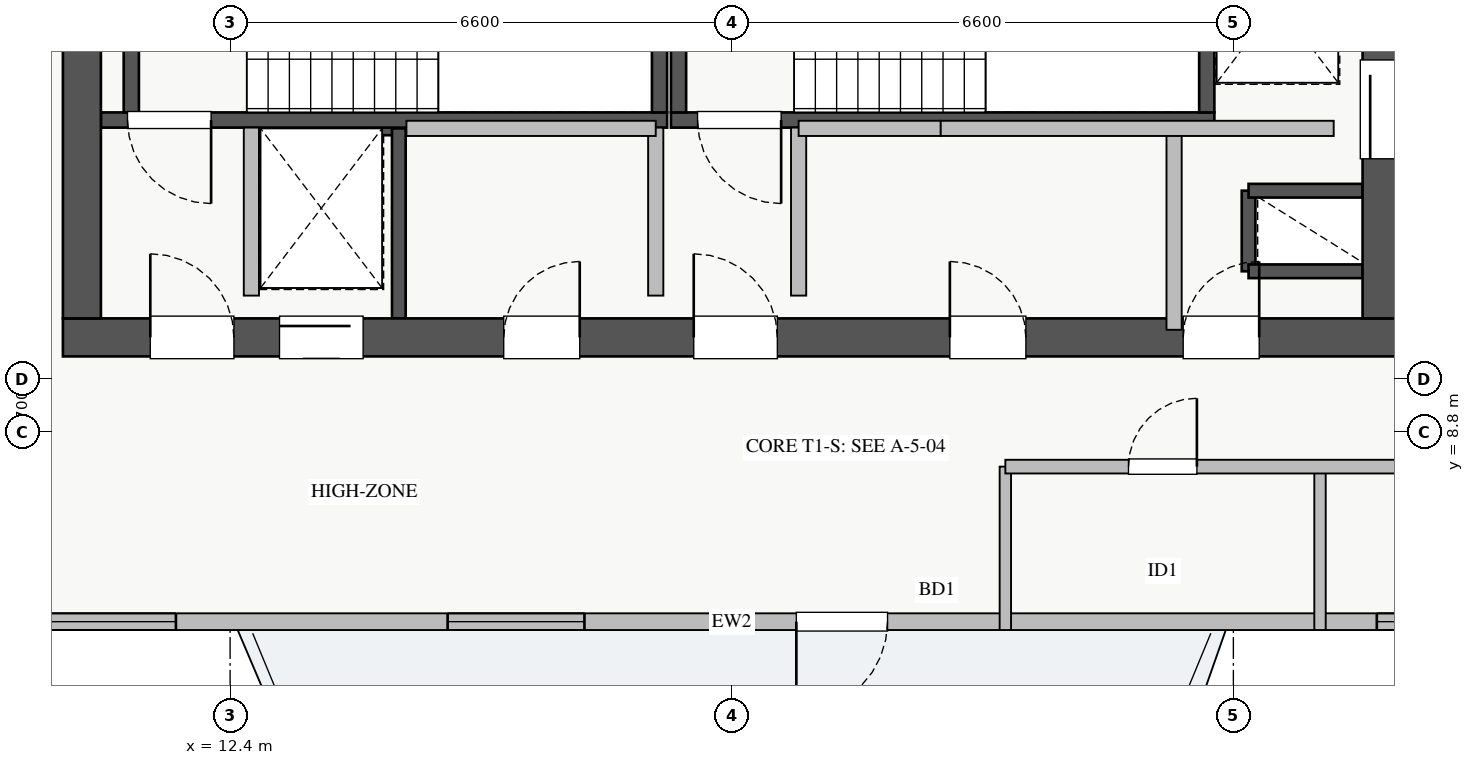
"""IFC4 building model, lengths in metres.
Left out: names, types, materials, properties, quantities, classifications, styles, units other than length and angle.
Written with IfcOpenShell. Run it as: python <this file> out.ifc"""

import sys

from ifc_helpers import new_model, si_unit, direction, frame, frame_2d, origin, place, context, subcontext, project, spatial, rectangle, extrude, source, transform, mapped, element, fill, save


model = new_model("IFC4")
c1 = context("Model", 3, precision=1e-05, world=origin(), true_north=direction((0.0, 1.0)))
c2 = subcontext(c1, "Body", "Model", "MODEL_VIEW")
j1 = project(units=[si_unit("LENGTHUNIT", "METRE"), si_unit("PLANEANGLEUNIT", "RADIAN")], contexts=[c1])
p1 = place(None, origin())
s1 = spatial("IfcSite", under=j1, at=p1, CompositionType="ELEMENT")
p2 = place(p1, origin())
s2 = spatial("IfcBuilding", under=s1, at=p2, CompositionType="ELEMENT")
p3 = place(p2, frame((0.0, 0.0, 216.5)))
s3 = spatial("IfcBuildingStorey", under=s2, at=p3, CompositionType="ELEMENT", Elevation=216.5)
p4 = place(p3, frame((12.68, 12.8, 0.0), z_axis=(0.0, 0.0, 1.0), x_axis=(1.0, 0.0, 0.0)))
e1 = element("IfcWall", 1, at=p4, inside=s3, PredefinedType="SHEAR", context=c2, shape_type="SweptSolid", body=[
    extrude(rectangle(XDim=1.94, YDim=0.18, at=frame_2d((0.97, 0.0))), origin(), (0.0, 0.0, 1.0), 3.07),
])
p5 = place(p3, frame((14.62, 10.3, 0.0), z_axis=(0.0, 0.0, 1.0), x_axis=(0.0, 1.0, 0.0)))
e2 = element("IfcWall", 2, at=p5, inside=s3, PredefinedType="SHEAR", context=c2, shape_type="SweptSolid", body=[
    extrude(rectangle(XDim=2.5, YDim=0.18, at=frame_2d((1.25, 0.0))), origin(), (0.0, 0.0, 1.0), 3.07),
])
p6 = place(p3, frame((25.8, 10.92, 0.0), z_axis=(0.0, 0.0, 1.0), x_axis=(0.0, 1.0, 0.0)))
e3 = element("IfcWall", 3, at=p6, inside=s3, PredefinedType="SHEAR", context=c2, shape_type="SweptSolid", body=[
    extrude(rectangle(XDim=1.06, YDim=0.18, at=frame_2d((0.53, 0.0))), origin(), (0.0, 0.0, 1.0), 3.07),
])
for number, where, z_axis, x_axis in (
    (4, (25.8, 11.98, 0.0), (0.0, 0.0, 1.0), (1.0, 0.0, 0.0)),
    (5, (25.8, 10.92, 0.0), (0.0, 0.0, 1.0), (1.0, 0.0, 0.0)),
):
    element("IfcWall", number, at=place(p3, frame(where, z_axis=z_axis, x_axis=x_axis)), inside=s3, PredefinedType="SHEAR", context=c2, shape_type="SweptSolid", body=[
        extrude(rectangle(XDim=1.5, YDim=0.18, at=frame_2d((0.75, 0.0))), origin(), (0.0, 0.0, 1.0), 3.07),
    ])
p7 = place(p3, frame((10.7, 12.91, 0.0), z_axis=(0.0, 0.0, 1.0), x_axis=(1.0, 0.0, 0.0)))
e6 = element("IfcWall", 6, at=p7, inside=s3, PredefinedType="SHEAR", context=c2, shape_type="SweptSolid", body=[
    extrude(rectangle(XDim=7.45, YDim=0.2, at=frame_2d((3.725, 0.0))), origin(), (0.0, 0.0, 1.0), 3.25),
])
p8 = place(p7, frame((0.35, 0.0, 0.0)))
e7 = element("IfcOpeningElement", 7, at=p8, cuts=e6, PredefinedType="OPENING", context=c2, shape_type="SweptSolid", body=[
    extrude(rectangle(XDim=1.1, YDim=2.05, at=frame_2d((0.55, 1.025))), frame((0.0, 0.11, 0.0), z_axis=(0.0, -1.0, 0.0), x_axis=(1.0, 0.0, 0.0)), (0.0, 0.0, 1.0), 0.22),
])
for number, where, z_axis, x_axis in (
    (8, (11.1, 13.01, 0.0), (0.0, 0.0, 1.0), (0.0, 1.0, 0.0)),
    (9, (18.05, 13.01, 0.0), (0.0, 0.0, 1.0), (0.0, 1.0, 0.0)),
):
    element("IfcWall", number, at=place(p3, frame(where, z_axis=z_axis, x_axis=x_axis)), inside=s3, PredefinedType="SHEAR", context=c2, shape_type="SweptSolid", body=[
        extrude(rectangle(XDim=2.94, YDim=0.2, at=frame_2d((1.47, 0.0))), origin(), (0.0, 0.0, 1.0), 3.25),
    ])
p9 = place(p3, frame((18.2, 12.91, 0.0), z_axis=(0.0, 0.0, 1.0), x_axis=(1.0, 0.0, 0.0)))
e10 = element("IfcWall", 10, at=p9, inside=s3, PredefinedType="SHEAR", context=c2, shape_type="SweptSolid", body=[
    extrude(rectangle(XDim=7.15, YDim=0.2, at=frame_2d((3.575, 0.0))), origin(), (0.0, 0.0, 1.0), 3.25),
])
p10 = place(p9, frame((0.35, 0.0, 0.0)))
e11 = element("IfcOpeningElement", 11, at=p10, cuts=e10, PredefinedType="OPENING", context=c2, shape_type="SweptSolid", body=[
    extrude(rectangle(XDim=1.1, YDim=2.05, at=frame_2d((0.55, 1.025))), frame((0.0, 0.11, 0.0), z_axis=(0.0, -1.0, 0.0), x_axis=(1.0, 0.0, 0.0)), (0.0, 0.0, 1.0), 0.22),
])
for number, where, z_axis, x_axis in (
    (12, (18.3, 13.01, 0.0), (0.0, 0.0, 1.0), (0.0, 1.0, 0.0)),
    (13, (25.25, 13.01, 0.0), (0.0, 0.0, 1.0), (0.0, 1.0, 0.0)),
):
    element("IfcWall", number, at=place(p3, frame(where, z_axis=z_axis, x_axis=x_axis)), inside=s3, PredefinedType="SHEAR", context=c2, shape_type="SweptSolid", body=[
        extrude(rectangle(XDim=2.94, YDim=0.2, at=frame_2d((1.47, 0.0))), origin(), (0.0, 0.0, 1.0), 3.25),
    ])
p11 = place(p3, frame((10.2, 10.05, 0.0), z_axis=(0.0, 0.0, 1.0), x_axis=(1.0, 0.0, 0.0)))
e14 = element("IfcWall", 14, at=p11, inside=s3, PredefinedType="SHEAR", context=c2, shape_type="SweptSolid", body=[
    extrude(rectangle(XDim=17.6, YDim=0.5, at=frame_2d((8.8, 0.0))), origin(), (0.0, 0.0, 1.0), 3.25),
])
p12 = place(p11, frame((1.15, 0.0, 0.0)))
e15 = element("IfcOpeningElement", 15, at=p12, cuts=e14, PredefinedType="OPENING", context=c2, shape_type="SweptSolid", body=[
    extrude(rectangle(XDim=1.1, YDim=2.05, at=frame_2d((0.55, 1.025))), frame((0.0, 0.26, 0.0), z_axis=(0.0, -1.0, 0.0), x_axis=(1.0, 0.0, 0.0)), (0.0, 0.0, 1.0), 0.52),
])
p13 = place(p11, frame((8.3, 0.0, 0.0)))
e16 = element("IfcOpeningElement", 16, at=p13, cuts=e14, PredefinedType="OPENING", context=c2, shape_type="SweptSolid", body=[
    extrude(rectangle(XDim=1.1, YDim=2.05, at=frame_2d((0.55, 1.025))), frame((0.0, 0.26, 0.0), z_axis=(0.0, -1.0, 0.0), x_axis=(1.0, 0.0, 0.0)), (0.0, 0.0, 1.0), 0.52),
])
p14 = place(p11, frame((2.85, 0.0, 0.0)))
e17 = element("IfcOpeningElement", 17, at=p14, cuts=e14, PredefinedType="OPENING", context=c2, shape_type="SweptSolid", body=[
    extrude(rectangle(XDim=1.1, YDim=2.05, at=frame_2d((0.55, 1.025))), frame((0.0, 0.26, 0.0), z_axis=(0.0, -1.0, 0.0), x_axis=(1.0, 0.0, 0.0)), (0.0, 0.0, 1.0), 0.52),
])
p15 = place(p11, frame((5.8, 0.0, 0.0)))
e18 = element("IfcOpeningElement", 18, at=p15, cuts=e14, PredefinedType="OPENING", context=c2, shape_type="SweptSolid", body=[
    extrude(rectangle(XDim=1.0, YDim=2.05, at=frame_2d((0.5, 1.025))), frame((0.0, 0.26, 0.0), z_axis=(0.0, -1.0, 0.0), x_axis=(1.0, 0.0, 0.0)), (0.0, 0.0, 1.0), 0.52),
])
p16 = place(p11, frame((14.74, 0.0, 0.0)))
e19 = element("IfcOpeningElement", 19, at=p16, cuts=e14, PredefinedType="OPENING", context=c2, shape_type="SweptSolid", body=[
    extrude(rectangle(XDim=1.0, YDim=2.05, at=frame_2d((0.5, 1.025))), frame((0.0, 0.26, 0.0), z_axis=(0.0, -1.0, 0.0), x_axis=(1.0, 0.0, 0.0)), (0.0, 0.0, 1.0), 0.52),
])
p17 = place(p11, frame((11.67, 0.0, 0.0)))
e20 = element("IfcOpeningElement", 20, at=p17, cuts=e14, PredefinedType="OPENING", context=c2, shape_type="SweptSolid", body=[
    extrude(rectangle(XDim=1.0, YDim=2.05, at=frame_2d((0.5, 1.025))), frame((0.0, 0.26, 0.0), z_axis=(0.0, -1.0, 0.0), x_axis=(1.0, 0.0, 0.0)), (0.0, 0.0, 1.0), 0.52),
])
p18 = place(p3, frame((10.45, 10.3, 0.0), z_axis=(0.0, 0.0, 1.0), x_axis=(0.0, 1.0, 0.0)))
e21 = element("IfcWall", 21, at=p18, inside=s3, PredefinedType="SHEAR", context=c2, shape_type="SweptSolid", body=[
    extrude(rectangle(XDim=6.2, YDim=0.5, at=frame_2d((3.1, 0.0))), origin(), (0.0, 0.0, 1.0), 3.25),
])
p19 = place(p3, frame((27.55, 10.3, 0.0), z_axis=(0.0, 0.0, 1.0), x_axis=(0.0, 1.0, 0.0)))
e22 = element("IfcWall", 22, at=p19, inside=s3, PredefinedType="SHEAR", context=c2, shape_type="SweptSolid", body=[
    extrude(rectangle(XDim=6.2, YDim=0.5, at=frame_2d((3.1, 0.0))), origin(), (0.0, 0.0, 1.0), 3.25),
])
p20 = place(p19, frame((2.1, 0.0, 0.0)))
e23 = element("IfcOpeningElement", 23, at=p20, cuts=e22, PredefinedType="OPENING", context=c2, shape_type="SweptSolid", body=[
    extrude(rectangle(XDim=1.3, YDim=2.05, at=frame_2d((0.65, 1.025))), frame((0.0, 0.26, 0.0), z_axis=(0.0, -1.0, 0.0), x_axis=(1.0, 0.0, 0.0)), (0.0, 0.0, 1.0), 0.52),
])
p21 = place(p3, frame((7.65, 6.31, 0.0), z_axis=(0.0, 0.0, 1.0), x_axis=(1.0, 0.0, 0.0)))
e24 = element("IfcWall", 24, at=p21, inside=s3, PredefinedType="STANDARD", context=c2, shape_type="SweptSolid", body=[
    extrude(rectangle(XDim=22.7, YDim=0.22, at=frame_2d((11.35, 0.0))), origin(), (0.0, 0.0, 1.0), 2.61),
])
p22 = place(p21, frame((12.2, 0.0, 0.0)))
e25 = element("IfcOpeningElement", 25, at=p22, cuts=e24, PredefinedType="OPENING", context=c2, shape_type="SweptSolid", body=[
    extrude(rectangle(XDim=1.2, YDim=2.1, at=frame_2d((0.6, 1.05))), frame((0.0, 0.12, 0.0), z_axis=(0.0, -1.0, 0.0), x_axis=(1.0, 0.0, 0.0)), (0.0, 0.0, 1.0), 0.24),
])
p23 = place(p21, frame((1.637, 0.0, 0.9)))
e26 = element("IfcOpeningElement", 26, at=p23, cuts=e24, PredefinedType="OPENING", context=c2, shape_type="SweptSolid", body=[
    extrude(rectangle(XDim=2.4, YDim=1.48, at=frame_2d((1.2, 0.74))), frame((0.0, 0.12, 0.0), z_axis=(0.0, -1.0, 0.0), x_axis=(1.0, 0.0, 0.0)), (0.0, 0.0, 1.0), 0.24),
])
p24 = place(p21, frame((7.612, 0.0, 0.9)))
e27 = element("IfcOpeningElement", 27, at=p24, cuts=e24, PredefinedType="OPENING", context=c2, shape_type="SweptSolid", body=[
    extrude(rectangle(XDim=1.8, YDim=1.45, at=frame_2d((0.9, 0.725))), frame((0.0, 0.12, 0.0), z_axis=(0.0, -1.0, 0.0), x_axis=(1.0, 0.0, 0.0)), (0.0, 0.0, 1.0), 0.24),
])
p25 = place(p21, frame((19.837, 0.0, 0.9)))
e28 = element("IfcOpeningElement", 28, at=p25, cuts=e24, PredefinedType="OPENING", context=c2, shape_type="SweptSolid", body=[
    extrude(rectangle(XDim=2.1, YDim=1.5, at=frame_2d((1.05, 0.75))), frame((0.0, 0.12, 0.0), z_axis=(0.0, -1.0, 0.0), x_axis=(1.0, 0.0, 0.0)), (0.0, 0.0, 1.0), 0.24),
])
for number, where, z_axis, x_axis in (
    (29, (12.68, 10.6, 0.0), (0.0, 0.0, 1.0), (0.0, 1.0, 0.0)),
    (30, (18.0, 10.6, 0.0), (0.0, 0.0, 1.0), (0.0, 1.0, 0.0)),
    (31, (19.88, 10.6, 0.0), (0.0, 0.0, 1.0), (0.0, 1.0, 0.0)),
):
    element("IfcWall", number, at=place(p3, frame(where, z_axis=z_axis, x_axis=x_axis)), inside=s3, PredefinedType="PARTITIONING", context=c2, shape_type="SweptSolid", body=[
        extrude(rectangle(XDim=2.21, YDim=0.2, at=frame_2d((1.105, 0.0))), origin(), (0.0, 0.0, 1.0), 3.07),
    ])
p26 = place(p3, frame((14.72, 12.8, 0.0), z_axis=(0.0, 0.0, 1.0), x_axis=(1.0, 0.0, 0.0)))
e32 = element("IfcWall", 32, at=p26, inside=s3, PredefinedType="PARTITIONING", context=c2, shape_type="SweptSolid", body=[
    extrude(rectangle(XDim=3.28, YDim=0.2, at=frame_2d((1.64, 0.0))), origin(), (0.0, 0.0, 1.0), 3.07),
])
p27 = place(p3, frame((24.82, 10.15, 0.0), z_axis=(0.0, 0.0, 1.0), x_axis=(0.0, 1.0, 0.0)))
e33 = element("IfcWall", 33, at=p27, inside=s3, PredefinedType="PARTITIONING", context=c2, shape_type="SweptSolid", body=[
    extrude(rectangle(XDim=2.65, YDim=0.2, at=frame_2d((1.325, 0.0))), origin(), (0.0, 0.0, 1.0), 3.07),
])
p28 = place(p3, frame((19.88, 12.8, 0.0), z_axis=(0.0, 0.0, 1.0), x_axis=(1.0, 0.0, 0.0)))
e34 = element("IfcWall", 34, at=p28, inside=s3, PredefinedType="PARTITIONING", context=c2, shape_type="SweptSolid", body=[
    extrude(rectangle(XDim=1.87, YDim=0.2, at=frame_2d((0.935, 0.0))), origin(), (0.0, 0.0, 1.0), 3.07),
])
p29 = place(p3, frame((21.75, 12.8, 0.0), z_axis=(0.0, 0.0, 1.0), x_axis=(1.0, 0.0, 0.0)))
e35 = element("IfcWall", 35, at=p29, inside=s3, PredefinedType="PARTITIONING", context=c2, shape_type="SweptSolid", body=[
    extrude(rectangle(XDim=5.17, YDim=0.2, at=frame_2d((2.585, 0.0))), origin(), (0.0, 0.0, 1.0), 3.07),
])
for number, where, z_axis, x_axis in (
    (36, (22.6, 6.2, 0.0), (0.0, 0.0, 1.0), (0.0, 1.0, 0.0)),
    (37, (26.74, 6.2, 0.0), (0.0, 0.0, 1.0), (0.0, 1.0, 0.0)),
):
    element("IfcWall", number, at=place(p3, frame(where, z_axis=z_axis, x_axis=x_axis)), inside=s3, PredefinedType="PARTITIONING", context=c2, shape_type="SweptSolid", body=[
        extrude(rectangle(XDim=2.15, YDim=0.15, at=frame_2d((1.075, 0.0))), origin(), (0.0, 0.0, 1.0), 3.07),
    ])
p30 = place(p3, frame((22.6, 8.35, 0.0), z_axis=(0.0, 0.0, 1.0), x_axis=(1.0, 0.0, 0.0)))
e38 = element("IfcWall", 38, at=p30, inside=s3, PredefinedType="PARTITIONING", context=c2, shape_type="SweptSolid", body=[
    extrude(rectangle(XDim=9.85, YDim=0.18, at=frame_2d((4.925, 0.0))), origin(), (0.0, 0.0, 1.0), 3.07),
])
p31 = place(p30, frame((1.62, 0.0, 0.0)))
e39 = element("IfcOpeningElement", 39, at=p31, cuts=e38, PredefinedType="OPENING", context=c2, shape_type="SweptSolid", body=[
    extrude(rectangle(XDim=0.9, YDim=2.05, at=frame_2d((0.45, 1.025))), frame((0.0, 0.1, 0.0), z_axis=(0.0, -1.0, 0.0), x_axis=(1.0, 0.0, 0.0)), (0.0, 0.0, 1.0), 0.2),
])
p32 = place(p30, frame((5.76, 0.0, 0.0)))
e40 = element("IfcOpeningElement", 40, at=p32, cuts=e38, PredefinedType="OPENING", context=c2, shape_type="SweptSolid", body=[
    extrude(rectangle(XDim=0.9, YDim=2.05, at=frame_2d((0.45, 1.025))), frame((0.0, 0.1, 0.0), z_axis=(0.0, -1.0, 0.0), x_axis=(1.0, 0.0, 0.0)), (0.0, 0.0, 1.0), 0.2),
])
m1 = source(origin(), c2, "Body", "SweptSolid", [
    extrude(rectangle(XDim=1.2, YDim=2.1, at=frame_2d((0.6, 1.05))), frame((0.0, 0.025, 0.0), z_axis=(0.0, -1.0, 0.0), x_axis=(1.0, 0.0, 0.0)), (0.0, 0.0, 1.0), 0.05),
])
p33 = place(p22, frame((1.2, 0.0, 0.0), z_axis=(0.0, 0.0, 1.0), x_axis=(-1.0, 0.0, 0.0)))
e41 = element("IfcDoor", 41, at=p33, inside=s3, OperationType="SINGLE_SWING_LEFT", PredefinedType="DOOR", context=c2, shape_type="MappedRepresentation", body=[
    mapped(m1, transform((0.0, 0.0, 0.0), x_axis=(1.0, 0.0, 0.0), y_axis=(0.0, 1.0, 0.0), z_axis=(0.0, 0.0, 1.0), scale=1.0)),
])
fill(e25, e41)
m2 = source(origin(), c2, "Body", "SweptSolid", [
    extrude(rectangle(XDim=2.4, YDim=1.48, at=frame_2d((1.2, 0.74))), frame((0.0, 0.03, 0.0), z_axis=(0.0, -1.0, 0.0), x_axis=(1.0, 0.0, 0.0)), (0.0, 0.0, 1.0), 0.06),
])
p34 = place(p23, origin())
e42 = element("IfcWindow", 42, at=p34, inside=s3, PartitioningType="TRIPLE_PANEL_VERTICAL", PredefinedType="WINDOW", context=c2, shape_type="MappedRepresentation", body=[
    mapped(m2, transform((0.0, 0.0, 0.0), x_axis=(1.0, 0.0, 0.0), y_axis=(0.0, 1.0, 0.0), z_axis=(0.0, 0.0, 1.0), scale=1.0)),
])
fill(e26, e42)
m3 = source(origin(), c2, "Body", "SweptSolid", [
    extrude(rectangle(XDim=1.8, YDim=1.45, at=frame_2d((0.9, 0.725))), frame((0.0, 0.03, 0.0), z_axis=(0.0, -1.0, 0.0), x_axis=(1.0, 0.0, 0.0)), (0.0, 0.0, 1.0), 0.06),
])
p35 = place(p24, origin())
e43 = element("IfcWindow", 43, at=p35, inside=s3, PartitioningType="DOUBLE_PANEL_VERTICAL", PredefinedType="WINDOW", context=c2, shape_type="MappedRepresentation", body=[
    mapped(m3, transform((0.0, 0.0, 0.0), x_axis=(1.0, 0.0, 0.0), y_axis=(0.0, 1.0, 0.0), z_axis=(0.0, 0.0, 1.0), scale=1.0)),
])
fill(e27, e43)
m4 = source(origin(), c2, "Body", "SweptSolid", [
    extrude(rectangle(XDim=2.1, YDim=1.5, at=frame_2d((1.05, 0.75))), frame((0.0, 0.03, 0.0), z_axis=(0.0, -1.0, 0.0), x_axis=(1.0, 0.0, 0.0)), (0.0, 0.0, 1.0), 0.06),
])
p36 = place(p25, origin())
e44 = element("IfcWindow", 44, at=p36, inside=s3, PartitioningType="TRIPLE_PANEL_VERTICAL", PredefinedType="WINDOW", context=c2, shape_type="MappedRepresentation", body=[
    mapped(m4, transform((0.0, 0.0, 0.0), x_axis=(1.0, 0.0, 0.0), y_axis=(0.0, 1.0, 0.0), z_axis=(0.0, 0.0, 1.0), scale=1.0)),
])
fill(e28, e44)
m5 = source(origin(), c2, "Body", "SweptSolid", [
    extrude(rectangle(XDim=1.3, YDim=2.05, at=frame_2d((0.65, 1.025))), frame((0.0, 0.025, 0.0), z_axis=(0.0, -1.0, 0.0), x_axis=(1.0, 0.0, 0.0)), (0.0, 0.0, 1.0), 0.05),
])
p37 = place(p20, origin())
e45 = element("IfcDoor", 45, at=p37, inside=s3, OperationType="SLIDING_TO_RIGHT", PredefinedType="DOOR", context=c2, shape_type="MappedRepresentation", body=[
    mapped(m5, transform((0.0, 0.0, 0.0), x_axis=(1.0, 0.0, 0.0), y_axis=(0.0, 1.0, 0.0), z_axis=(0.0, 0.0, 1.0), scale=1.0)),
])
fill(e23, e45)
m6 = source(origin(), c2, "Body", "SweptSolid", [
    extrude(rectangle(XDim=1.1, YDim=2.05, at=frame_2d((0.55, 1.025))), frame((0.0, 0.025, 0.0), z_axis=(0.0, -1.0, 0.0), x_axis=(1.0, 0.0, 0.0)), (0.0, 0.0, 1.0), 0.05),
])
p38 = place(p12, origin())
e46 = element("IfcDoor", 46, at=p38, inside=s3, OperationType="SINGLE_SWING_LEFT", PredefinedType="DOOR", context=c2, shape_type="MappedRepresentation", body=[
    mapped(m6, transform((0.0, 0.0, 0.0), x_axis=(1.0, 0.0, 0.0), y_axis=(0.0, 1.0, 0.0), z_axis=(0.0, 0.0, 1.0), scale=1.0)),
])
fill(e15, e46)
p39 = place(p8, frame((1.1, 0.0, 0.0), z_axis=(0.0, 0.0, 1.0), x_axis=(-1.0, 0.0, 0.0)))
e47 = element("IfcDoor", 47, at=p39, inside=s3, OperationType="SINGLE_SWING_RIGHT", PredefinedType="DOOR", context=c2, shape_type="MappedRepresentation", body=[
    mapped(m6, transform((0.0, 0.0, 0.0), x_axis=(1.0, 0.0, 0.0), y_axis=(0.0, 1.0, 0.0), z_axis=(0.0, 0.0, 1.0), scale=1.0)),
])
fill(e7, e47)
p40 = place(p13, origin())
e48 = element("IfcDoor", 48, at=p40, inside=s3, OperationType="SINGLE_SWING_LEFT", PredefinedType="DOOR", context=c2, shape_type="MappedRepresentation", body=[
    mapped(m6, transform((0.0, 0.0, 0.0), x_axis=(1.0, 0.0, 0.0), y_axis=(0.0, 1.0, 0.0), z_axis=(0.0, 0.0, 1.0), scale=1.0)),
])
fill(e16, e48)
p41 = place(p10, frame((1.1, 0.0, 0.0), z_axis=(0.0, 0.0, 1.0), x_axis=(-1.0, 0.0, 0.0)))
e49 = element("IfcDoor", 49, at=p41, inside=s3, OperationType="SINGLE_SWING_RIGHT", PredefinedType="DOOR", context=c2, shape_type="MappedRepresentation", body=[
    mapped(m6, transform((0.0, 0.0, 0.0), x_axis=(1.0, 0.0, 0.0), y_axis=(0.0, 1.0, 0.0), z_axis=(0.0, 0.0, 1.0), scale=1.0)),
])
fill(e11, e49)
p42 = place(p14, origin())
e50 = element("IfcDoor", 50, at=p42, inside=s3, OperationType="SLIDING_TO_RIGHT", PredefinedType="DOOR", context=c2, shape_type="MappedRepresentation", body=[
    mapped(m6, transform((0.0, 0.0, 0.0), x_axis=(1.0, 0.0, 0.0), y_axis=(0.0, 1.0, 0.0), z_axis=(0.0, 0.0, 1.0), scale=1.0)),
])
fill(e17, e50)
m7 = source(origin(), c2, "Body", "SweptSolid", [
    extrude(rectangle(XDim=1.0, YDim=2.05, at=frame_2d((0.5, 1.025))), frame((0.0, 0.025, 0.0), z_axis=(0.0, -1.0, 0.0), x_axis=(1.0, 0.0, 0.0)), (0.0, 0.0, 1.0), 0.05),
])
p43 = place(p15, origin())
e51 = element("IfcDoor", 51, at=p43, inside=s3, OperationType="SINGLE_SWING_RIGHT", PredefinedType="DOOR", context=c2, shape_type="MappedRepresentation", body=[
    mapped(m7, transform((0.0, 0.0, 0.0), x_axis=(1.0, 0.0, 0.0), y_axis=(0.0, 1.0, 0.0), z_axis=(0.0, 0.0, 1.0), scale=1.0)),
])
fill(e18, e51)
p44 = place(p16, origin())
e52 = element("IfcDoor", 52, at=p44, inside=s3, OperationType="SINGLE_SWING_RIGHT", PredefinedType="DOOR", context=c2, shape_type="MappedRepresentation", body=[
    mapped(m7, transform((0.0, 0.0, 0.0), x_axis=(1.0, 0.0, 0.0), y_axis=(0.0, 1.0, 0.0), z_axis=(0.0, 0.0, 1.0), scale=1.0)),
])
fill(e19, e52)
p45 = place(p17, origin())
e53 = element("IfcDoor", 53, at=p45, inside=s3, OperationType="SINGLE_SWING_LEFT", PredefinedType="DOOR", context=c2, shape_type="MappedRepresentation", body=[
    mapped(m7, transform((0.0, 0.0, 0.0), x_axis=(1.0, 0.0, 0.0), y_axis=(0.0, 1.0, 0.0), z_axis=(0.0, 0.0, 1.0), scale=1.0)),
])
fill(e20, e53)
m8 = source(origin(), c2, "Body", "SweptSolid", [
    extrude(rectangle(XDim=0.9, YDim=2.05, at=frame_2d((0.45, 1.025))), frame((0.0, 0.025, 0.0), z_axis=(0.0, -1.0, 0.0), x_axis=(1.0, 0.0, 0.0)), (0.0, 0.0, 1.0), 0.05),
])
p46 = place(p31, origin())
e54 = element("IfcDoor", 54, at=p46, inside=s3, OperationType="SINGLE_SWING_RIGHT", PredefinedType="DOOR", context=c2, shape_type="MappedRepresentation", body=[
    mapped(m8, transform((0.0, 0.0, 0.0), x_axis=(1.0, 0.0, 0.0), y_axis=(0.0, 1.0, 0.0), z_axis=(0.0, 0.0, 1.0), scale=1.0)),
])
fill(e39, e54)
save(model, sys.argv[1])
